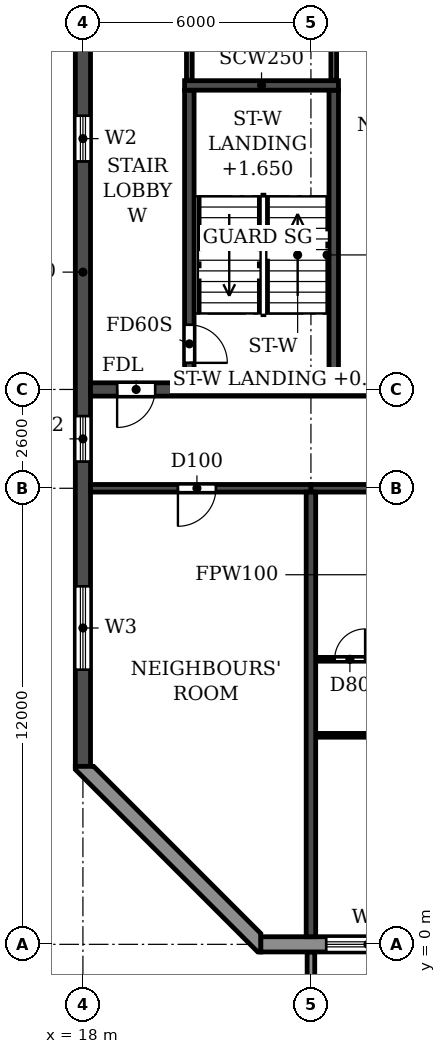
"""IFC4 building model, lengths in metres.
Left out: names, types, materials, properties, quantities, classifications, styles, units other than length and angle.
Written with IfcOpenShell. Run it as: python <this file> out.ifc"""

import sys

from ifc_helpers import new_model, si_unit, direction, frame, frame_2d, origin, place, context, subcontext, project, spatial, polyline, rectangle, outline, extrude, source, transform, mapped, element, fill, save


model = new_model("IFC4")
c1 = context("Model", 3, precision=1e-05, world=origin(), true_north=direction((0.0, 1.0)))
c2 = subcontext(c1, "Body", "Model", "MODEL_VIEW")
j1 = project(units=[si_unit("LENGTHUNIT", "METRE"), si_unit("PLANEANGLEUNIT", "RADIAN")], contexts=[c1])
p1 = place(None, origin())
s1 = spatial("IfcSite", under=j1, at=p1, CompositionType="ELEMENT")
p2 = place(p1, origin())
s2 = spatial("IfcBuilding", under=s1, at=p2, CompositionType="ELEMENT")
p3 = place(p2, frame((0.0, 0.0, 257.7)))
s3 = spatial("IfcBuildingStorey", under=s2, at=p3, CompositionType="ELEMENT", Elevation=257.7)
p4 = place(p3, frame((24.0, 0.2, 0.0), z_axis=(0.0, 0.0, 1.0), x_axis=(0.0, 1.0, 0.0)))
e1 = element("IfcWall", 1, at=p4, inside=s3, PredefinedType="SHEAR", context=c2, shape_type="SweptSolid", body=[
    extrude(rectangle(XDim=11.7, YDim=0.25, at=frame_2d((5.85, 0.0))), origin(), (0.0, 0.0, 1.0), 3.0),
])
p5 = place(p3, frame((18.0, 4.683, 0.0), z_axis=(0.0, 0.0, 1.0), x_axis=(0.0, 1.0, 0.0)))
e2 = element("IfcWall", 2, at=p5, inside=s3, PredefinedType="SHEAR", context=c2, shape_type="SweptSolid", body=[
    extrude(rectangle(XDim=31.834, YDim=0.4, at=frame_2d((15.917, 0.0))), origin(), (0.0, 0.0, 1.0), 3.0),
])
p6 = place(p5, frame((23.817, 0.0, 0.9)))
e3 = element("IfcOpeningElement", 3, at=p6, cuts=e2, PredefinedType="OPENING", context=c2, shape_type="SweptSolid", body=[
    extrude(rectangle(XDim=1.2, YDim=1.5, at=frame_2d((0.6, 0.75))), frame((0.0, 0.21, 0.0), z_axis=(0.0, -1.0, 0.0), x_axis=(1.0, 0.0, 0.0)), (0.0, 0.0, 1.0), 0.42),
])
p7 = place(p5, frame((8.017, 0.0, 0.9)))
e4 = element("IfcOpeningElement", 4, at=p7, cuts=e2, PredefinedType="OPENING", context=c2, shape_type="SweptSolid", body=[
    extrude(rectangle(XDim=1.2, YDim=1.5, at=frame_2d((0.6, 0.75))), frame((0.0, 0.21, 0.0), z_axis=(0.0, -1.0, 0.0), x_axis=(1.0, 0.0, 0.0)), (0.0, 0.0, 1.0), 0.42),
])
p8 = place(p5, frame((27.694, 0.0, 0.6)))
e5 = element("IfcOpeningElement", 5, at=p8, cuts=e2, PredefinedType="OPENING", context=c2, shape_type="SweptSolid", body=[
    extrude(rectangle(XDim=2.2, YDim=1.8, at=frame_2d((1.1, 0.9))), frame((0.0, 0.21, 0.0), z_axis=(0.0, -1.0, 0.0), x_axis=(1.0, 0.0, 0.0)), (0.0, 0.0, 1.0), 0.42),
])
p9 = place(p5, frame((2.541, 0.0, 0.6)))
e6 = element("IfcOpeningElement", 6, at=p9, cuts=e2, PredefinedType="OPENING", context=c2, shape_type="SweptSolid", body=[
    extrude(rectangle(XDim=2.2, YDim=1.8, at=frame_2d((1.1, 0.9))), frame((0.0, 0.21, 0.0), z_axis=(0.0, -1.0, 0.0), x_axis=(1.0, 0.0, 0.0)), (0.0, 0.0, 1.0), 0.42),
])
p10 = place(p5, frame((15.917, 0.0, 0.9)))
e7 = element("IfcOpeningElement", 7, at=p10, cuts=e2, PredefinedType="OPENING", context=c2, shape_type="SweptSolid", body=[
    extrude(rectangle(XDim=1.2, YDim=1.5, at=frame_2d((0.6, 0.75))), frame((0.0, 0.21, 0.0), z_axis=(0.0, -1.0, 0.0), x_axis=(1.0, 0.0, 0.0)), (0.0, 0.0, 1.0), 0.42),
])
p11 = place(p3, frame((18.2, 12.0, 0.0), z_axis=(0.0, 0.0, 1.0), x_axis=(1.0, 0.0, 0.0)))
e8 = element("IfcWall", 8, at=p11, inside=s3, PredefinedType="SHEAR", context=c2, shape_type="SweptSolid", body=[
    extrude(rectangle(XDim=5.8, YDim=0.2, at=frame_2d((2.9, 0.0))), origin(), (0.0, 0.0, 1.0), 2.4),
])
p12 = place(p11, frame((2.3, 0.0, 0.0)))
e9 = element("IfcOpeningElement", 9, at=p12, cuts=e8, PredefinedType="OPENING", context=c2, shape_type="SweptSolid", body=[
    extrude(rectangle(XDim=1.0, YDim=2.1, at=frame_2d((0.5, 1.05))), frame((0.0, 0.11, 0.0), z_axis=(0.0, -1.0, 0.0), x_axis=(1.0, 0.0, 0.0)), (0.0, 0.0, 1.0), 0.22),
])
p13 = place(p3, frame((24.0, 12.0, 0.0), z_axis=(0.0, 0.0, 1.0), x_axis=(1.0, 0.0, 0.0)))
e10 = element("IfcWall", 10, at=p13, inside=s3, PredefinedType="SHEAR", context=c2, shape_type="SweptSolid", body=[
    extrude(rectangle(XDim=6.0, YDim=0.2, at=frame_2d((3.0, 0.0))), origin(), (0.0, 0.0, 1.0), 2.4),
])
p14 = place(p13, frame((2.45, 0.0, 0.0)))
e11 = element("IfcOpeningElement", 11, at=p14, cuts=e10, PredefinedType="OPENING", context=c2, shape_type="SweptSolid", body=[
    extrude(rectangle(XDim=1.0, YDim=2.1, at=frame_2d((0.5, 1.05))), frame((0.0, 0.11, 0.0), z_axis=(0.0, -1.0, 0.0), x_axis=(1.0, 0.0, 0.0)), (0.0, 0.0, 1.0), 0.22),
])
p15 = place(p3, frame((18.2, 14.6, 0.0), z_axis=(0.0, 0.0, 1.0), x_axis=(1.0, 0.0, 0.0)))
e12 = element("IfcWall", 12, at=p15, inside=s3, PredefinedType="SOLIDWALL", context=c2, shape_type="SweptSolid", body=[
    extrude(rectangle(XDim=65.6, YDim=0.35, at=frame_2d((32.8, 0.0))), origin(), (0.0, 0.0, 1.0), 3.0),
])
p16 = place(p15, frame((0.7, 0.0, 0.0)))
e13 = element("IfcOpeningElement", 13, at=p16, cuts=e12, PredefinedType="OPENING", context=c2, shape_type="SweptSolid", body=[
    extrude(rectangle(XDim=1.0, YDim=2.1, at=frame_2d((0.5, 1.05))), frame((0.0, 0.185, 0.0), z_axis=(0.0, -1.0, 0.0), x_axis=(1.0, 0.0, 0.0)), (0.0, 0.0, 1.0), 0.37),
])
p17 = place(p15, frame((8.6, 0.0, 0.0)))
e14 = element("IfcOpeningElement", 14, at=p17, cuts=e12, PredefinedType="OPENING", context=c2, shape_type="SweptSolid", body=[
    extrude(rectangle(XDim=1.0, YDim=2.1, at=frame_2d((0.5, 1.05))), frame((0.0, 0.185, 0.0), z_axis=(0.0, -1.0, 0.0), x_axis=(1.0, 0.0, 0.0)), (0.0, 0.0, 1.0), 0.37),
])
p18 = place(p15, frame((13.2, 0.0, 0.0)))
e15 = element("IfcOpeningElement", 15, at=p18, cuts=e12, PredefinedType="OPENING", context=c2, shape_type="SweptSolid", body=[
    extrude(rectangle(XDim=1.0, YDim=2.1, at=frame_2d((0.5, 1.05))), frame((0.0, 0.185, 0.0), z_axis=(0.0, -1.0, 0.0), x_axis=(1.0, 0.0, 0.0)), (0.0, 0.0, 1.0), 0.37),
])
p19 = place(p15, frame((24.5, 0.0, 0.0)))
e16 = element("IfcOpeningElement", 16, at=p19, cuts=e12, PredefinedType="OPENING", context=c2, shape_type="SweptSolid", body=[
    extrude(rectangle(XDim=1.0, YDim=2.1, at=frame_2d((0.5, 1.05))), frame((0.0, 0.185, 0.0), z_axis=(0.0, -1.0, 0.0), x_axis=(1.0, 0.0, 0.0)), (0.0, 0.0, 1.0), 0.37),
])
p20 = place(p15, frame((28.4, 0.0, 0.0)))
e17 = element("IfcOpeningElement", 17, at=p20, cuts=e12, PredefinedType="OPENING", context=c2, shape_type="SweptSolid", body=[
    extrude(rectangle(XDim=1.0, YDim=2.1, at=frame_2d((0.5, 1.05))), frame((0.0, 0.185, 0.0), z_axis=(0.0, -1.0, 0.0), x_axis=(1.0, 0.0, 0.0)), (0.0, 0.0, 1.0), 0.37),
])
p21 = place(p15, frame((32.3, 0.0, 0.0)))
e18 = element("IfcOpeningElement", 18, at=p21, cuts=e12, PredefinedType="OPENING", context=c2, shape_type="SweptSolid", body=[
    extrude(rectangle(XDim=1.0, YDim=2.1, at=frame_2d((0.5, 1.05))), frame((0.0, 0.185, 0.0), z_axis=(0.0, -1.0, 0.0), x_axis=(1.0, 0.0, 0.0)), (0.0, 0.0, 1.0), 0.37),
])
p22 = place(p15, frame((34.9, 0.0, 0.0)))
e19 = element("IfcOpeningElement", 19, at=p22, cuts=e12, PredefinedType="OPENING", context=c2, shape_type="SweptSolid", body=[
    extrude(rectangle(XDim=1.0, YDim=2.1, at=frame_2d((0.5, 1.05))), frame((0.0, 0.185, 0.0), z_axis=(0.0, -1.0, 0.0), x_axis=(1.0, 0.0, 0.0)), (0.0, 0.0, 1.0), 0.37),
])
p23 = place(p15, frame((38.8, 0.0, 0.0)))
e20 = element("IfcOpeningElement", 20, at=p23, cuts=e12, PredefinedType="OPENING", context=c2, shape_type="SweptSolid", body=[
    extrude(rectangle(XDim=1.0, YDim=2.1, at=frame_2d((0.5, 1.05))), frame((0.0, 0.185, 0.0), z_axis=(0.0, -1.0, 0.0), x_axis=(1.0, 0.0, 0.0)), (0.0, 0.0, 1.0), 0.37),
])
p24 = place(p15, frame((51.4, 0.0, 0.0)))
e21 = element("IfcOpeningElement", 21, at=p24, cuts=e12, PredefinedType="OPENING", context=c2, shape_type="SweptSolid", body=[
    extrude(rectangle(XDim=1.0, YDim=2.1, at=frame_2d((0.5, 1.05))), frame((0.0, 0.185, 0.0), z_axis=(0.0, -1.0, 0.0), x_axis=(1.0, 0.0, 0.0)), (0.0, 0.0, 1.0), 0.37),
])
p25 = place(p15, frame((56.0, 0.0, 0.0)))
e22 = element("IfcOpeningElement", 22, at=p25, cuts=e12, PredefinedType="OPENING", context=c2, shape_type="SweptSolid", body=[
    extrude(rectangle(XDim=1.0, YDim=2.1, at=frame_2d((0.5, 1.05))), frame((0.0, 0.185, 0.0), z_axis=(0.0, -1.0, 0.0), x_axis=(1.0, 0.0, 0.0)), (0.0, 0.0, 1.0), 0.37),
])
p26 = place(p15, frame((63.9, 0.0, 0.0)))
e23 = element("IfcOpeningElement", 23, at=p26, cuts=e12, PredefinedType="OPENING", context=c2, shape_type="SweptSolid", body=[
    extrude(rectangle(XDim=1.0, YDim=2.1, at=frame_2d((0.5, 1.05))), frame((0.0, 0.185, 0.0), z_axis=(0.0, -1.0, 0.0), x_axis=(1.0, 0.0, 0.0)), (0.0, 0.0, 1.0), 0.37),
])
p27 = place(p3, frame((20.8, 14.775, 0.0), z_axis=(0.0, 0.0, 1.0), x_axis=(0.0, 1.0, 0.0)))
e24 = element("IfcWall", 24, at=p27, inside=s3, PredefinedType="SOLIDWALL", context=c2, shape_type="SweptSolid", body=[
    extrude(rectangle(XDim=7.7, YDim=0.25, at=frame_2d((3.85, 0.0))), origin(), (0.0, 0.0, 1.0), 3.0),
])
p28 = place(p27, frame((0.525, 0.0, 0.0)))
e25 = element("IfcOpeningElement", 25, at=p28, cuts=e24, PredefinedType="OPENING", context=c2, shape_type="SweptSolid", body=[
    extrude(rectangle(XDim=1.0, YDim=2.1, at=frame_2d((0.5, 1.05))), frame((0.0, 0.135, 0.0), z_axis=(0.0, -1.0, 0.0), x_axis=(1.0, 0.0, 0.0)), (0.0, 0.0, 1.0), 0.27),
])
p29 = place(p3, frame((24.6, 14.775, 0.0), z_axis=(0.0, 0.0, 1.0), x_axis=(0.0, 1.0, 0.0)))
e26 = element("IfcWall", 26, at=p29, inside=s3, PredefinedType="SOLIDWALL", context=c2, shape_type="SweptSolid", body=[
    extrude(rectangle(XDim=7.7, YDim=0.25, at=frame_2d((3.85, 0.0))), origin(), (0.0, 0.0, 1.0), 3.0),
])
p30 = place(p3, frame((20.675, 22.6, 0.0), z_axis=(0.0, 0.0, 1.0), x_axis=(1.0, 0.0, 0.0)))
e27 = element("IfcWall", 27, at=p30, inside=s3, PredefinedType="SOLIDWALL", context=c2, shape_type="SweptSolid", body=[
    extrude(rectangle(XDim=4.05, YDim=0.25, at=frame_2d((2.025, 0.0))), origin(), (0.0, 0.0, 1.0), 3.0),
])
p31 = place(p3, frame((22.683, 0.0, 0.0), z_axis=(0.0, 0.0, 1.0), x_axis=(1.0, 0.0, 0.0)))
e28 = element("IfcWall", 28, at=p31, inside=s3, PredefinedType="STANDARD", context=c2, shape_type="SweptSolid", body=[
    extrude(rectangle(XDim=56.634, YDim=0.4, at=frame_2d((28.317, 0.0))), origin(), (0.0, 0.0, 1.0), 3.0),
])
p32 = place(p31, frame((1.717, 0.0, 0.9)))
e29 = element("IfcOpeningElement", 29, at=p32, cuts=e28, PredefinedType="OPENING", context=c2, shape_type="SweptSolid", body=[
    extrude(rectangle(XDim=2.2, YDim=1.5, at=frame_2d((1.1, 0.75))), frame((0.0, 0.21, 0.0), z_axis=(0.0, -1.0, 0.0), x_axis=(1.0, 0.0, 0.0)), (0.0, 0.0, 1.0), 0.42),
])
p33 = place(p31, frame((4.917, 0.0, 0.0)))
e30 = element("IfcOpeningElement", 30, at=p33, cuts=e28, PredefinedType="OPENING", context=c2, shape_type="SweptSolid", body=[
    extrude(rectangle(XDim=1.8, YDim=2.4, at=frame_2d((0.9, 1.2))), frame((0.0, 0.21, 0.0), z_axis=(0.0, -1.0, 0.0), x_axis=(1.0, 0.0, 0.0)), (0.0, 0.0, 1.0), 0.42),
])
p34 = place(p31, frame((7.717, 0.0, 0.9)))
e31 = element("IfcOpeningElement", 31, at=p34, cuts=e28, PredefinedType="OPENING", context=c2, shape_type="SweptSolid", body=[
    extrude(rectangle(XDim=2.2, YDim=1.5, at=frame_2d((1.1, 0.75))), frame((0.0, 0.21, 0.0), z_axis=(0.0, -1.0, 0.0), x_axis=(1.0, 0.0, 0.0)), (0.0, 0.0, 1.0), 0.42),
])
p35 = place(p31, frame((10.717, 0.0, 0.9)))
e32 = element("IfcOpeningElement", 32, at=p35, cuts=e28, PredefinedType="OPENING", context=c2, shape_type="SweptSolid", body=[
    extrude(rectangle(XDim=2.2, YDim=1.5, at=frame_2d((1.1, 0.75))), frame((0.0, 0.21, 0.0), z_axis=(0.0, -1.0, 0.0), x_axis=(1.0, 0.0, 0.0)), (0.0, 0.0, 1.0), 0.42),
])
p36 = place(p31, frame((13.717, 0.0, 0.9)))
e33 = element("IfcOpeningElement", 33, at=p36, cuts=e28, PredefinedType="OPENING", context=c2, shape_type="SweptSolid", body=[
    extrude(rectangle(XDim=2.2, YDim=1.5, at=frame_2d((1.1, 0.75))), frame((0.0, 0.21, 0.0), z_axis=(0.0, -1.0, 0.0), x_axis=(1.0, 0.0, 0.0)), (0.0, 0.0, 1.0), 0.42),
])
p37 = place(p31, frame((16.917, 0.0, 0.0)))
e34 = element("IfcOpeningElement", 34, at=p37, cuts=e28, PredefinedType="OPENING", context=c2, shape_type="SweptSolid", body=[
    extrude(rectangle(XDim=1.8, YDim=2.4, at=frame_2d((0.9, 1.2))), frame((0.0, 0.21, 0.0), z_axis=(0.0, -1.0, 0.0), x_axis=(1.0, 0.0, 0.0)), (0.0, 0.0, 1.0), 0.42),
])
p38 = place(p31, frame((19.717, 0.0, 0.9)))
e35 = element("IfcOpeningElement", 35, at=p38, cuts=e28, PredefinedType="OPENING", context=c2, shape_type="SweptSolid", body=[
    extrude(rectangle(XDim=2.2, YDim=1.5, at=frame_2d((1.1, 0.75))), frame((0.0, 0.21, 0.0), z_axis=(0.0, -1.0, 0.0), x_axis=(1.0, 0.0, 0.0)), (0.0, 0.0, 1.0), 0.42),
])
p39 = place(p31, frame((22.717, 0.0, 0.9)))
e36 = element("IfcOpeningElement", 36, at=p39, cuts=e28, PredefinedType="OPENING", context=c2, shape_type="SweptSolid", body=[
    extrude(rectangle(XDim=2.2, YDim=1.5, at=frame_2d((1.1, 0.75))), frame((0.0, 0.21, 0.0), z_axis=(0.0, -1.0, 0.0), x_axis=(1.0, 0.0, 0.0)), (0.0, 0.0, 1.0), 0.42),
])
p40 = place(p31, frame((25.717, 0.0, 0.9)))
e37 = element("IfcOpeningElement", 37, at=p40, cuts=e28, PredefinedType="OPENING", context=c2, shape_type="SweptSolid", body=[
    extrude(rectangle(XDim=2.2, YDim=1.5, at=frame_2d((1.1, 0.75))), frame((0.0, 0.21, 0.0), z_axis=(0.0, -1.0, 0.0), x_axis=(1.0, 0.0, 0.0)), (0.0, 0.0, 1.0), 0.42),
])
p41 = place(p31, frame((28.917, 0.0, 0.0)))
e38 = element("IfcOpeningElement", 38, at=p41, cuts=e28, PredefinedType="OPENING", context=c2, shape_type="SweptSolid", body=[
    extrude(rectangle(XDim=1.8, YDim=2.4, at=frame_2d((0.9, 1.2))), frame((0.0, 0.21, 0.0), z_axis=(0.0, -1.0, 0.0), x_axis=(1.0, 0.0, 0.0)), (0.0, 0.0, 1.0), 0.42),
])
p42 = place(p31, frame((31.717, 0.0, 0.9)))
e39 = element("IfcOpeningElement", 39, at=p42, cuts=e28, PredefinedType="OPENING", context=c2, shape_type="SweptSolid", body=[
    extrude(rectangle(XDim=2.2, YDim=1.5, at=frame_2d((1.1, 0.75))), frame((0.0, 0.21, 0.0), z_axis=(0.0, -1.0, 0.0), x_axis=(1.0, 0.0, 0.0)), (0.0, 0.0, 1.0), 0.42),
])
p43 = place(p31, frame((34.717, 0.0, 0.9)))
e40 = element("IfcOpeningElement", 40, at=p43, cuts=e28, PredefinedType="OPENING", context=c2, shape_type="SweptSolid", body=[
    extrude(rectangle(XDim=2.2, YDim=1.5, at=frame_2d((1.1, 0.75))), frame((0.0, 0.21, 0.0), z_axis=(0.0, -1.0, 0.0), x_axis=(1.0, 0.0, 0.0)), (0.0, 0.0, 1.0), 0.42),
])
p44 = place(p31, frame((37.717, 0.0, 0.9)))
e41 = element("IfcOpeningElement", 41, at=p44, cuts=e28, PredefinedType="OPENING", context=c2, shape_type="SweptSolid", body=[
    extrude(rectangle(XDim=2.2, YDim=1.5, at=frame_2d((1.1, 0.75))), frame((0.0, 0.21, 0.0), z_axis=(0.0, -1.0, 0.0), x_axis=(1.0, 0.0, 0.0)), (0.0, 0.0, 1.0), 0.42),
])
p45 = place(p31, frame((40.917, 0.0, 0.0)))
e42 = element("IfcOpeningElement", 42, at=p45, cuts=e28, PredefinedType="OPENING", context=c2, shape_type="SweptSolid", body=[
    extrude(rectangle(XDim=1.8, YDim=2.4, at=frame_2d((0.9, 1.2))), frame((0.0, 0.21, 0.0), z_axis=(0.0, -1.0, 0.0), x_axis=(1.0, 0.0, 0.0)), (0.0, 0.0, 1.0), 0.42),
])
p46 = place(p31, frame((43.717, 0.0, 0.9)))
e43 = element("IfcOpeningElement", 43, at=p46, cuts=e28, PredefinedType="OPENING", context=c2, shape_type="SweptSolid", body=[
    extrude(rectangle(XDim=2.2, YDim=1.5, at=frame_2d((1.1, 0.75))), frame((0.0, 0.21, 0.0), z_axis=(0.0, -1.0, 0.0), x_axis=(1.0, 0.0, 0.0)), (0.0, 0.0, 1.0), 0.42),
])
p47 = place(p31, frame((46.717, 0.0, 0.9)))
e44 = element("IfcOpeningElement", 44, at=p47, cuts=e28, PredefinedType="OPENING", context=c2, shape_type="SweptSolid", body=[
    extrude(rectangle(XDim=2.2, YDim=1.5, at=frame_2d((1.1, 0.75))), frame((0.0, 0.21, 0.0), z_axis=(0.0, -1.0, 0.0), x_axis=(1.0, 0.0, 0.0)), (0.0, 0.0, 1.0), 0.42),
])
p48 = place(p31, frame((49.717, 0.0, 0.9)))
e45 = element("IfcOpeningElement", 45, at=p48, cuts=e28, PredefinedType="OPENING", context=c2, shape_type="SweptSolid", body=[
    extrude(rectangle(XDim=2.2, YDim=1.5, at=frame_2d((1.1, 0.75))), frame((0.0, 0.21, 0.0), z_axis=(0.0, -1.0, 0.0), x_axis=(1.0, 0.0, 0.0)), (0.0, 0.0, 1.0), 0.42),
])
p49 = place(p31, frame((52.917, 0.0, 0.0)))
e46 = element("IfcOpeningElement", 46, at=p49, cuts=e28, PredefinedType="OPENING", context=c2, shape_type="SweptSolid", body=[
    extrude(rectangle(XDim=1.8, YDim=2.4, at=frame_2d((0.9, 1.2))), frame((0.0, 0.21, 0.0), z_axis=(0.0, -1.0, 0.0), x_axis=(1.0, 0.0, 0.0)), (0.0, 0.0, 1.0), 0.42),
])
p50 = place(p3, origin())
e47 = element("IfcWall", 47, at=p50, inside=s3, PredefinedType="STANDARD", context=c2, shape_type="SweptSolid", body=[
    extrude(outline(polyline([(17.8, 4.683), (17.8, 4.6), (22.6, -0.2), (22.683, -0.2), (22.683, 0.283), (18.283, 4.683), (17.8, 4.683)])), origin(), (0.0, 0.0, 1.0), 3.0),
])
m1 = source(origin(), c2, "Body", "SweptSolid", [
    extrude(outline(polyline([(0.0, 0.0), (0.2, 0.0), (0.2, 1.65), (0.0, 1.65), (0.0, 0.0)])), origin(), (0.0, 0.0, 1.0), 3.1),
])
p51 = place(p3, frame((23.9, -1.85, 0.0)))
e48 = element("IfcWall", 48, at=p51, inside=s3, PredefinedType="STANDARD", context=c2, shape_type="MappedRepresentation", body=[
    mapped(m1, transform((0.0, 0.0, 0.0))),
])
p52 = place(p3, frame((24.135, 5.5, 0.0), z_axis=(0.0, 0.0, 1.0), x_axis=(1.0, 0.0, 0.0)))
e49 = element("IfcWall", 49, at=p52, inside=s3, PredefinedType="PARTITIONING", context=c2, shape_type="SweptSolid", body=[
    extrude(rectangle(XDim=2.915, YDim=0.1, at=frame_2d((1.458, 0.0))), origin(), (0.0, 0.0, 1.0), 3.0),
])
p53 = place(p52, frame((1.465, 0.0, 0.0)))
e50 = element("IfcOpeningElement", 50, at=p53, cuts=e49, PredefinedType="OPENING", context=c2, shape_type="SweptSolid", body=[
    extrude(rectangle(XDim=0.9, YDim=2.1, at=frame_2d((0.45, 1.05))), frame((0.0, 0.06, 0.0), z_axis=(0.0, -1.0, 0.0), x_axis=(1.0, 0.0, 0.0)), (0.0, 0.0, 1.0), 0.12),
])
p54 = place(p3, frame((24.135, 7.5, 0.0), z_axis=(0.0, 0.0, 1.0), x_axis=(1.0, 0.0, 0.0)))
e51 = element("IfcWall", 51, at=p54, inside=s3, PredefinedType="PARTITIONING", context=c2, shape_type="SweptSolid", body=[
    extrude(rectangle(XDim=1.965, YDim=0.1, at=frame_2d((0.982, 0.0))), origin(), (0.0, 0.0, 1.0), 3.0),
])
p55 = place(p54, frame((0.49, 0.0, 0.0)))
e52 = element("IfcOpeningElement", 52, at=p55, cuts=e51, PredefinedType="OPENING", context=c2, shape_type="SweptSolid", body=[
    extrude(rectangle(XDim=0.8, YDim=2.1, at=frame_2d((0.4, 1.05))), frame((0.0, 0.06, 0.0), z_axis=(0.0, -1.0, 0.0), x_axis=(1.0, 0.0, 0.0)), (0.0, 0.0, 1.0), 0.12),
])
for number, where, z_axis, x_axis in (
    (53, (20.8, 22.735, 0.0), (0.0, 0.0, 1.0), (0.0, 1.0, 0.0)),
    (54, (24.6, 22.735, 0.0), (0.0, 0.0, 1.0), (0.0, 1.0, 0.0)),
):
    element("IfcWall", number, at=place(p3, frame(where, z_axis=z_axis, x_axis=x_axis)), inside=s3, PredefinedType="PARTITIONING", context=c2, shape_type="SweptSolid", body=[
        extrude(rectangle(XDim=4.88, YDim=0.15, at=frame_2d((2.44, 0.0))), origin(), (0.0, 0.0, 1.0), 3.0),
    ])
p56 = place(p32, origin())
e55 = element("IfcWindow", 55, at=p56, inside=s3, PartitioningType="DOUBLE_PANEL_HORIZONTAL", PredefinedType="WINDOW", context=c2, shape_type="SweptSolid", body=[
    extrude(rectangle(XDim=2.2, YDim=1.5, at=frame_2d((1.1, 0.75))), frame((0.0, 0.03, 0.0), z_axis=(0.0, -1.0, 0.0), x_axis=(1.0, 0.0, 0.0)), (0.0, 0.0, 1.0), 0.06),
])
fill(e29, e55)
p57 = place(p7, origin())
e56 = element("IfcWindow", 56, at=p57, inside=s3, PartitioningType="SINGLE_PANEL", PredefinedType="WINDOW", context=c2, shape_type="SweptSolid", body=[
    extrude(rectangle(XDim=1.2, YDim=1.5, at=frame_2d((0.6, 0.75))), frame((0.0, 0.03, 0.0), z_axis=(0.0, -1.0, 0.0), x_axis=(1.0, 0.0, 0.0)), (0.0, 0.0, 1.0), 0.06),
])
fill(e4, e56)
p58 = place(p9, origin())
e57 = element("IfcWindow", 57, at=p58, inside=s3, PartitioningType="DOUBLE_PANEL_HORIZONTAL", PredefinedType="WINDOW", context=c2, shape_type="SweptSolid", body=[
    extrude(rectangle(XDim=2.2, YDim=1.8, at=frame_2d((1.1, 0.9))), frame((0.0, 0.03, 0.0), z_axis=(0.0, -1.0, 0.0), x_axis=(1.0, 0.0, 0.0)), (0.0, 0.0, 1.0), 0.06),
])
fill(e6, e57)
p59 = place(p10, origin())
e58 = element("IfcWindow", 58, at=p59, inside=s3, PartitioningType="SINGLE_PANEL", PredefinedType="WINDOW", context=c2, shape_type="SweptSolid", body=[
    extrude(rectangle(XDim=1.2, YDim=1.5, at=frame_2d((0.6, 0.75))), frame((0.0, 0.03, 0.0), z_axis=(0.0, -1.0, 0.0), x_axis=(1.0, 0.0, 0.0)), (0.0, 0.0, 1.0), 0.06),
])
fill(e7, e58)
p60 = place(p16, frame((1.0, 0.0, 0.0), z_axis=(0.0, 0.0, 1.0), x_axis=(-1.0, 0.0, 0.0)))
e59 = element("IfcDoor", 59, at=p60, inside=s3, OperationType="SINGLE_SWING_RIGHT", PredefinedType="DOOR", context=c2, shape_type="SweptSolid", body=[
    extrude(rectangle(XDim=1.0, YDim=2.1, at=frame_2d((0.5, 1.05))), frame((0.0, 0.025, 0.0), z_axis=(0.0, -1.0, 0.0), x_axis=(1.0, 0.0, 0.0)), (0.0, 0.0, 1.0), 0.05),
])
fill(e13, e59)
p61 = place(p12, frame((1.0, 0.0, 0.0), z_axis=(0.0, 0.0, 1.0), x_axis=(-1.0, 0.0, 0.0)))
e60 = element("IfcDoor", 60, at=p61, inside=s3, OperationType="SINGLE_SWING_RIGHT", PredefinedType="DOOR", context=c2, shape_type="SweptSolid", body=[
    extrude(rectangle(XDim=1.0, YDim=2.1, at=frame_2d((0.5, 1.05))), frame((0.0, 0.025, 0.0), z_axis=(0.0, -1.0, 0.0), x_axis=(1.0, 0.0, 0.0)), (0.0, 0.0, 1.0), 0.05),
])
fill(e9, e60)
p62 = place(p55, origin())
e61 = element("IfcDoor", 61, at=p62, inside=s3, OperationType="SINGLE_SWING_RIGHT", PredefinedType="DOOR", context=c2, shape_type="SweptSolid", body=[
    extrude(rectangle(XDim=0.8, YDim=2.1, at=frame_2d((0.4, 1.05))), frame((0.0, 0.025, 0.0), z_axis=(0.0, -1.0, 0.0), x_axis=(1.0, 0.0, 0.0)), (0.0, 0.0, 1.0), 0.05),
])
fill(e52, e61)
p63 = place(p28, frame((1.0, 0.0, 0.0), z_axis=(0.0, 0.0, 1.0), x_axis=(-1.0, 0.0, 0.0)))
e62 = element("IfcDoor", 62, at=p63, inside=s3, OperationType="SINGLE_SWING_RIGHT", PredefinedType="DOOR", context=c2, shape_type="SweptSolid", body=[
    extrude(rectangle(XDim=1.0, YDim=2.1, at=frame_2d((0.5, 1.05))), frame((0.0, 0.025, 0.0), z_axis=(0.0, -1.0, 0.0), x_axis=(1.0, 0.0, 0.0)), (0.0, 0.0, 1.0), 0.05),
])
fill(e25, e62)
save(model, sys.argv[1])
